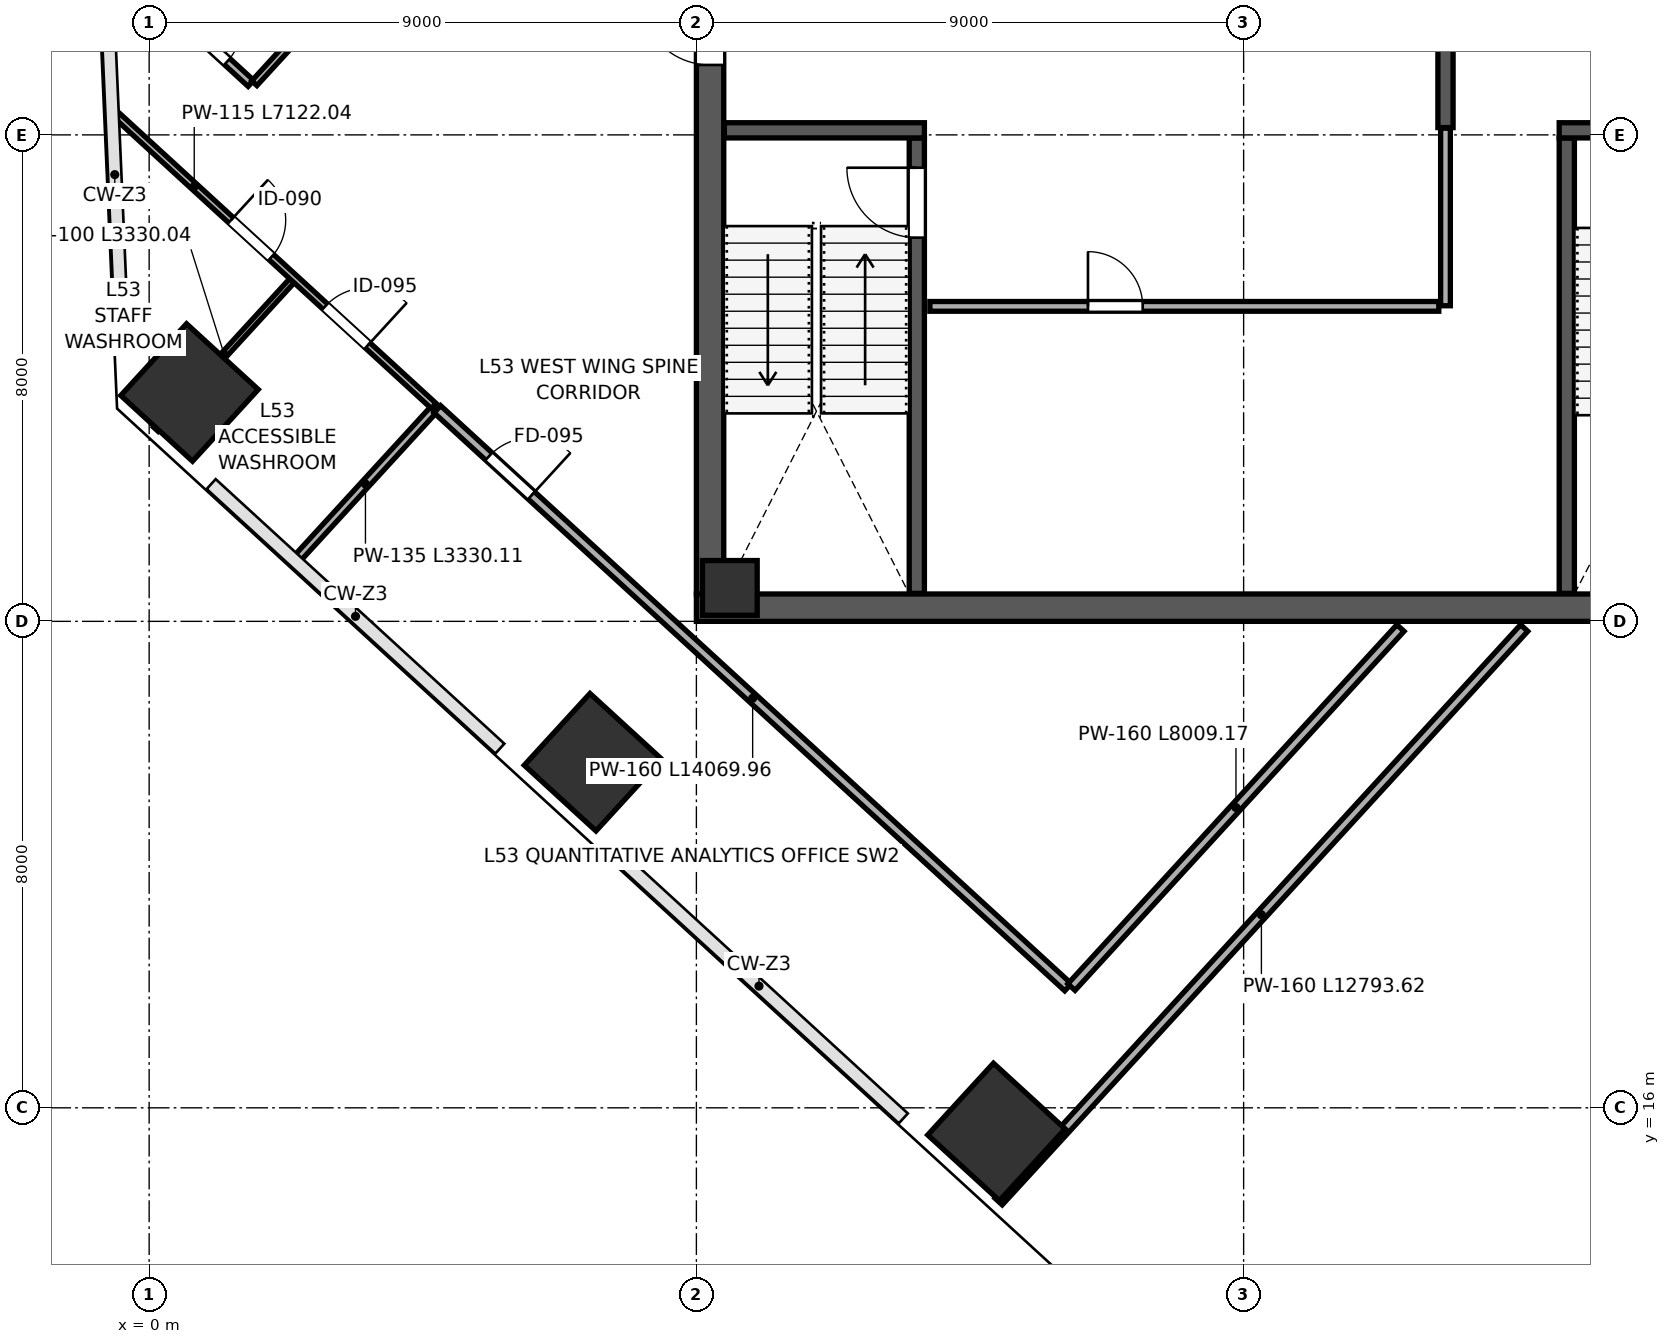
"""IFC4 building model, lengths in metres.
Left out: names, types, materials, properties, quantities, classifications, styles, units other than length and angle.
Written with IfcOpenShell. Run it as: python <this file> out.ifc"""

import sys

from ifc_helpers import new_model, si_unit, direction, frame, frame_2d, origin, origin_2d, place, context, subcontext, project, spatial, rectangle, extrude, source, transform, mapped, element, fill, save


model = new_model("IFC4")
c1 = context("Model", 3, precision=1e-05, world=origin(), true_north=direction((0.0, 1.0)))
c2 = subcontext(c1, "Body", "Model", "MODEL_VIEW")
j1 = project(units=[si_unit("LENGTHUNIT", "METRE"), si_unit("PLANEANGLEUNIT", "RADIAN")], contexts=[c1])
p1 = place(None, origin())
s1 = spatial("IfcSite", under=j1, at=p1, CompositionType="ELEMENT")
p2 = place(p1, origin())
s2 = spatial("IfcBuilding", under=s1, at=p2, CompositionType="ELEMENT")
p3 = place(p2, frame((0.0, 0.0, 237.4)))
s3 = spatial("IfcBuildingStorey", under=s2, at=p3, CompositionType="ELEMENT", Elevation=237.4)
m1 = source(origin(), c2, "Body", "SweptSolid", [
    extrude(rectangle(XDim=0.9, YDim=0.9, at=origin_2d()), origin(), (0.0, 0.0, 1.0), 4.199),
])
p4 = place(p3, frame((9.55, 24.55, 0.001), z_axis=(0.0, 0.0, 1.0), x_axis=(1.0, 0.0, 0.0)))
e1 = element("IfcColumn", 1, at=p4, inside=s3, PredefinedType="COLUMN", context=c2, shape_type="MappedRepresentation", body=[
    mapped(m1, transform((0.0, 0.0, 0.0), scale=1.0)),
])
m2 = source(origin(), c2, "Body", "SweptSolid", [
    extrude(rectangle(XDim=1.6, YDim=1.6, at=origin_2d()), origin(), (0.0, 0.0, 1.0), 4.199),
])
for number, where, z_axis, x_axis in (
    (2, (0.664, 27.764, 0.001), (0.0, 0.0, 1.0), (-0.737, 0.676, 0.0)),
    (3, (7.299, 21.683, 0.001), (0.0, 0.0, 1.0), (-0.737, 0.676, 0.0)),
    (4, (13.935, 15.603, 0.001), (0.0, 0.0, 1.0), (-0.737, 0.676, 0.0)),
):
    element("IfcColumn", number, at=place(p3, frame(where, z_axis=z_axis, x_axis=x_axis)), inside=s3, PredefinedType="COLUMN", context=c2, shape_type="MappedRepresentation", body=[
        mapped(m2, transform((0.0, 0.0, 0.0), scale=1.0)),
    ])
p5 = place(p3, frame((9.225, 24.45, 0.0), z_axis=(0.0, 0.0, 1.0), x_axis=(0.0, 1.0, 0.0)))
e5 = element("IfcWall", 5, at=p5, inside=s3, PredefinedType="SHEAR", context=c2, shape_type="SweptSolid", body=[
    extrude(rectangle(XDim=15.1, YDim=0.45, at=frame_2d((7.55, 0.0))), origin(), (0.0, 0.0, 1.0), 3.96),
])
p6 = place(p5, frame((8.7, 0.0, 0.0)))
e6 = element("IfcOpeningElement", 6, at=p6, cuts=e5, PredefinedType="OPENING", context=c2, shape_type="SweptSolid", body=[
    extrude(rectangle(XDim=1.15, YDim=2.2, at=frame_2d((0.575, 1.1))), frame((0.0, 0.235, 0.0), z_axis=(0.0, -1.0, 0.0), x_axis=(1.0, 0.0, 0.0)), (0.0, 0.0, 1.0), 0.47),
])
p7 = place(p3, frame((9.0, 24.225, 0.0), z_axis=(0.0, 0.0, 1.0), x_axis=(1.0, 0.0, 0.0)))
e7 = element("IfcWall", 7, at=p7, inside=s3, PredefinedType="SHEAR", context=c2, shape_type="SweptSolid", body=[
    extrude(rectangle(XDim=18.0, YDim=0.45, at=frame_2d((9.0, 0.0))), origin(), (0.0, 0.0, 1.0), 3.96),
])
p8 = place(p3, frame((12.625, 24.46, 0.0), z_axis=(0.0, 0.0, 1.0), x_axis=(0.0, 1.0, 0.0)))
e8 = element("IfcWall", 8, at=p8, inside=s3, PredefinedType="SHEAR", context=c2, shape_type="SweptSolid", body=[
    extrude(rectangle(XDim=7.49, YDim=0.25, at=frame_2d((3.745, 0.0))), origin(), (0.0, 0.0, 1.0), 3.96),
])
p9 = place(p8, frame((5.85, 0.0, 0.0)))
e9 = element("IfcOpeningElement", 9, at=p9, cuts=e8, PredefinedType="OPENING", context=c2, shape_type="SweptSolid", body=[
    extrude(rectangle(XDim=1.15, YDim=2.2, at=frame_2d((0.575, 1.1))), frame((0.0, 0.135, 0.0), z_axis=(0.0, -1.0, 0.0), x_axis=(1.0, 0.0, 0.0)), (0.0, 0.0, 1.0), 0.27),
])
p10 = place(p3, frame((9.46, 32.075, 0.0), z_axis=(0.0, 0.0, 1.0), x_axis=(1.0, 0.0, 0.0)))
e10 = element("IfcWall", 10, at=p10, inside=s3, PredefinedType="SHEAR", context=c2, shape_type="SweptSolid", body=[
    extrude(rectangle(XDim=3.29, YDim=0.25, at=frame_2d((1.645, 0.0))), origin(), (0.0, 0.0, 1.0), 3.96),
])
p11 = place(p3, frame((23.315, 24.46, 0.0), z_axis=(0.0, 0.0, 1.0), x_axis=(0.0, 1.0, 0.0)))
e11 = element("IfcWall", 11, at=p11, inside=s3, PredefinedType="SHEAR", context=c2, shape_type="SweptSolid", body=[
    extrude(rectangle(XDim=7.49, YDim=0.25, at=frame_2d((3.745, 0.0))), origin(), (0.0, 0.0, 1.0), 3.96),
])
p12 = place(p3, frame((23.19, 32.075, 0.0), z_axis=(0.0, 0.0, 1.0), x_axis=(1.0, 0.0, 0.0)))
e12 = element("IfcWall", 12, at=p12, inside=s3, PredefinedType="SHEAR", context=c2, shape_type="SweptSolid", body=[
    extrude(rectangle(XDim=3.35, YDim=0.25, at=frame_2d((1.675, 0.0))), origin(), (0.0, 0.0, 1.0), 3.96),
])
p13 = place(p12, frame((0.85, 0.0, 0.0)))
e13 = element("IfcOpeningElement", 13, at=p13, cuts=e12, PredefinedType="OPENING", context=c2, shape_type="SweptSolid", body=[
    extrude(rectangle(XDim=1.15, YDim=2.2, at=frame_2d((0.575, 1.1))), frame((0.0, 0.135, 0.0), z_axis=(0.0, -1.0, 0.0), x_axis=(1.0, 0.0, 0.0)), (0.0, 0.0, 1.0), 0.27),
])
p14 = place(p3, frame((21.32, 32.12, 0.0), z_axis=(0.0, 0.0, 1.0), x_axis=(0.0, 1.0, 0.0)))
e14 = element("IfcWall", 14, at=p14, inside=s3, PredefinedType="SHEAR", context=c2, shape_type="SweptSolid", body=[
    extrude(rectangle(XDim=7.42, YDim=0.25, at=frame_2d((3.71, 0.0))), origin(), (0.0, 0.0, 1.0), 3.96),
])
p15 = place(p14, frame((1.4, 0.0, 0.0)))
e15 = element("IfcOpeningElement", 15, at=p15, cuts=e14, PredefinedType="OPENING", context=c2, shape_type="SweptSolid", body=[
    extrude(rectangle(XDim=1.15, YDim=2.2, at=frame_2d((0.575, 1.1))), frame((0.0, 0.135, 0.0), z_axis=(0.0, -1.0, 0.0), x_axis=(1.0, 0.0, 0.0)), (0.0, 0.0, 1.0), 0.27),
])
p16 = place(p3, frame((12.84, 29.18, 0.0), z_axis=(0.0, 0.0, 1.0), x_axis=(1.0, 0.0, 0.0)))
e16 = element("IfcWall", 16, at=p16, inside=s3, PredefinedType="PARTITIONING", context=c2, shape_type="SweptSolid", body=[
    extrude(rectangle(XDim=8.37, YDim=0.16, at=frame_2d((4.185, 0.0))), origin(), (0.0, 0.0, 1.0), 3.96),
])
p17 = place(p16, frame((2.6, 0.0, 0.0)))
e17 = element("IfcOpeningElement", 17, at=p17, cuts=e16, PredefinedType="OPENING", context=c2, shape_type="SweptSolid", body=[
    extrude(rectangle(XDim=0.9, YDim=2.15, at=frame_2d((0.45, 1.075))), frame((0.0, 0.09, 0.0), z_axis=(0.0, -1.0, 0.0), x_axis=(1.0, 0.0, 0.0)), (0.0, 0.0, 1.0), 0.18),
])
p18 = place(p3, frame((21.32, 29.19, 0.0), z_axis=(0.0, 0.0, 1.0), x_axis=(0.0, 1.0, 0.0)))
e18 = element("IfcWall", 18, at=p18, inside=s3, PredefinedType="PARTITIONING", context=c2, shape_type="SweptSolid", body=[
    extrude(rectangle(XDim=2.92, YDim=0.16, at=frame_2d((1.46, 0.0))), origin(), (0.0, 0.0, 1.0), 3.96),
])
p19 = place(p3, frame((0.11, 27.159, 0.0), z_axis=(0.0, 0.0, 1.0), x_axis=(0.675605101048, 0.737263689217, 0.0)))
e19 = element("IfcWall", 19, at=p19, inside=s3, PredefinedType="PARTITIONING", context=c2, shape_type="SweptSolid", body=[
    extrude(rectangle(XDim=3.33, YDim=0.1, at=frame_2d((1.665, 0.0))), origin(), (0.0, 0.0, 1.0), 3.195),
])
p20 = place(p3, frame((2.432, 25.031, 0.0), z_axis=(0.0, 0.0, 1.0), x_axis=(0.675605101048, 0.737263689217, 0.0)))
e20 = element("IfcWall", 20, at=p20, inside=s3, PredefinedType="PARTITIONING", context=c2, shape_type="SweptSolid", body=[
    extrude(rectangle(XDim=3.33, YDim=0.135, at=frame_2d((1.665, 0.0))), origin(), (0.0, 0.0, 1.0), 3.195),
])
p21 = place(p3, frame((-0.571, 32.354, 0.0), z_axis=(0.0, 0.0, 1.0), x_axis=(0.737285035525, -0.675581805846, 0.0)))
e21 = element("IfcWall", 21, at=p21, inside=s3, PredefinedType="PARTITIONING", context=c2, shape_type="SweptSolid", body=[
    extrude(rectangle(XDim=7.122, YDim=0.115, at=frame_2d((3.561, 0.0))), origin(), (0.0, 0.0, 1.0), 3.96),
])
p22 = place(p21, frame((2.6, 0.0, 0.0)))
e22 = element("IfcOpeningElement", 22, at=p22, cuts=e21, PredefinedType="OPENING", context=c2, shape_type="SweptSolid", body=[
    extrude(rectangle(XDim=0.9, YDim=2.15, at=frame_2d((0.45, 1.075))), frame((0.0, 0.067, 0.0), z_axis=(0.0, -1.0, 0.0), x_axis=(1.0, 0.0, 0.0)), (0.0, 0.0, 1.0), 0.135),
])
p23 = place(p21, frame((4.7, 0.0, 0.0)))
e23 = element("IfcOpeningElement", 23, at=p23, cuts=e21, PredefinedType="OPENING", context=c2, shape_type="SweptSolid", body=[
    extrude(rectangle(XDim=0.95, YDim=2.15, at=frame_2d((0.475, 1.075))), frame((0.0, 0.067, 0.0), z_axis=(0.0, -1.0, 0.0), x_axis=(1.0, 0.0, 0.0)), (0.0, 0.0, 1.0), 0.135),
])
p24 = place(p3, frame((4.739, 27.489, 0.0), z_axis=(0.0, 0.0, 1.0), x_axis=(0.737276572642, -0.675591041558, 0.0)))
e24 = element("IfcWall", 24, at=p24, inside=s3, PredefinedType="PARTITIONING", context=c2, shape_type="SweptSolid", body=[
    extrude(rectangle(XDim=14.07, YDim=0.16, at=frame_2d((7.035, 0.0))), origin(), (0.0, 0.0, 1.0), 3.96),
])
p25 = place(p24, frame((1.15, 0.0, 0.0)))
e25 = element("IfcOpeningElement", 25, at=p25, cuts=e24, PredefinedType="OPENING", context=c2, shape_type="SweptSolid", body=[
    extrude(rectangle(XDim=0.95, YDim=2.15, at=frame_2d((0.475, 1.075))), frame((0.0, 0.09, 0.0), z_axis=(0.0, -1.0, 0.0), x_axis=(1.0, 0.0, 0.0)), (0.0, 0.0, 1.0), 0.18),
])
p26 = place(p3, frame((15.168, 17.986, 0.0), z_axis=(0.0, 0.0, 1.0), x_axis=(0.675616954369, 0.737252827034, 0.0)))
e26 = element("IfcWall", 26, at=p26, inside=s3, PredefinedType="PARTITIONING", context=c2, shape_type="SweptSolid", body=[
    extrude(rectangle(XDim=8.009, YDim=0.16, at=frame_2d((4.005, 0.0))), origin(), (0.0, 0.0, 1.0), 3.96),
])
p27 = place(p3, frame((-0.044, 34.421, 0.0), z_axis=(0.0, 0.0, 1.0), x_axis=(0.73728894688, -0.675577537229, 0.0)))
e27 = element("IfcWall", 27, at=p27, inside=s3, PredefinedType="PARTITIONING", context=c2, shape_type="SweptSolid", body=[
    extrude(rectangle(XDim=2.33, YDim=0.135, at=frame_2d((1.165, 0.0))), origin(), (0.0, 0.0, 1.0), 3.96),
])
p28 = place(p27, frame((0.85, 0.0, 0.0)))
e28 = element("IfcOpeningElement", 28, at=p28, cuts=e27, PredefinedType="OPENING", context=c2, shape_type="SweptSolid", body=[
    extrude(rectangle(XDim=0.95, YDim=2.15, at=frame_2d((0.475, 1.075))), frame((0.0, 0.078, 0.0), z_axis=(0.0, -1.0, 0.0), x_axis=(1.0, 0.0, 0.0)), (0.0, 0.0, 1.0), 0.155),
])
p29 = place(p3, frame((1.73, 32.85, 0.0), z_axis=(0.0, 0.0, 1.0), x_axis=(0.675589845589, 0.737277668546, 0.0)))
e29 = element("IfcWall", 29, at=p29, inside=s3, PredefinedType="PARTITIONING", context=c2, shape_type="SweptSolid", body=[
    extrude(rectangle(XDim=26.742, YDim=0.115, at=frame_2d((13.371, 0.0))), origin(), (0.0, 0.0, 1.0), 3.96),
])
p30 = place(p3, frame((13.971, 14.458, 0.0), z_axis=(0.0, 0.0, 1.0), x_axis=(0.675595861889, 0.737272155583, 0.0)))
e30 = element("IfcWall", 30, at=p30, inside=s3, PredefinedType="PARTITIONING", context=c2, shape_type="SweptSolid", body=[
    extrude(rectangle(XDim=12.794, YDim=0.16, at=frame_2d((6.397, 0.0))), origin(), (0.0, 0.0, 1.0), 3.96),
])
m3 = source(origin(), c2, "Body", "SweptSolid", [
    extrude(rectangle(XDim=1.15, YDim=2.2, at=frame_2d((0.575, 1.1))), frame((0.0, 0.025, 0.0), z_axis=(0.0, -1.0, 0.0), x_axis=(1.0, 0.0, 0.0)), (0.0, 0.0, 1.0), 0.05),
])
p31 = place(p9, origin())
e31 = element("IfcDoor", 31, at=p31, inside=s3, OperationType="SINGLE_SWING_RIGHT", PredefinedType="DOOR", context=c2, shape_type="MappedRepresentation", body=[
    mapped(m3, transform((0.0, 0.0, 0.0), scale=1.0)),
])
fill(e9, e31)
m4 = source(origin(), c2, "Body", "SweptSolid", [
    extrude(rectangle(XDim=1.15, YDim=2.2, at=frame_2d((0.575, 1.1))), frame((0.0, 0.025, 0.0), z_axis=(0.0, -1.0, 0.0), x_axis=(1.0, 0.0, 0.0)), (0.0, 0.0, 1.0), 0.05),
])
p32 = place(p6, origin())
e32 = element("IfcDoor", 32, at=p32, inside=s3, OperationType="SINGLE_SWING_RIGHT", PredefinedType="DOOR", context=c2, shape_type="MappedRepresentation", body=[
    mapped(m4, transform((0.0, 0.0, 0.0), scale=1.0)),
])
fill(e6, e32)
m5 = source(origin(), c2, "Body", "SweptSolid", [
    extrude(rectangle(XDim=0.9, YDim=2.15, at=frame_2d((0.45, 1.075))), frame((0.0, 0.025, 0.0), z_axis=(0.0, -1.0, 0.0), x_axis=(1.0, 0.0, 0.0)), (0.0, 0.0, 1.0), 0.05),
])
p33 = place(p17, origin())
e33 = element("IfcDoor", 33, at=p33, inside=s3, OperationType="SINGLE_SWING_LEFT", PredefinedType="DOOR", context=c2, shape_type="MappedRepresentation", body=[
    mapped(m5, transform((0.0, 0.0, 0.0), scale=1.0)),
])
fill(e17, e33)
m6 = source(origin(), c2, "Body", "SweptSolid", [
    extrude(rectangle(XDim=0.9, YDim=2.15, at=frame_2d((0.45, 1.075))), frame((0.0, 0.025, 0.0), z_axis=(0.0, -1.0, 0.0), x_axis=(1.0, 0.0, 0.0)), (0.0, 0.0, 1.0), 0.05),
])
p34 = place(p22, origin())
e34 = element("IfcDoor", 34, at=p34, inside=s3, OperationType="SINGLE_SWING_LEFT", PredefinedType="DOOR", context=c2, shape_type="MappedRepresentation", body=[
    mapped(m6, transform((0.0, 0.0, 0.0), scale=1.0)),
])
fill(e22, e34)
m7 = source(origin(), c2, "Body", "SweptSolid", [
    extrude(rectangle(XDim=0.95, YDim=2.15, at=frame_2d((0.475, 1.075))), frame((0.0, 0.025, 0.0), z_axis=(0.0, -1.0, 0.0), x_axis=(1.0, 0.0, 0.0)), (0.0, 0.0, 1.0), 0.05),
])
p35 = place(p23, origin())
e35 = element("IfcDoor", 35, at=p35, inside=s3, OperationType="SINGLE_SWING_RIGHT", PredefinedType="DOOR", context=c2, shape_type="MappedRepresentation", body=[
    mapped(m7, transform((0.0, 0.0, 0.0), scale=1.0)),
])
fill(e23, e35)
m8 = source(origin(), c2, "Body", "SweptSolid", [
    extrude(rectangle(XDim=0.95, YDim=2.15, at=frame_2d((0.475, 1.075))), frame((0.0, 0.025, 0.0), z_axis=(0.0, -1.0, 0.0), x_axis=(1.0, 0.0, 0.0)), (0.0, 0.0, 1.0), 0.05),
])
p36 = place(p25, origin())
e36 = element("IfcDoor", 36, at=p36, inside=s3, OperationType="SINGLE_SWING_RIGHT", PredefinedType="DOOR", context=c2, shape_type="MappedRepresentation", body=[
    mapped(m8, transform((0.0, 0.0, 0.0), scale=1.0)),
])
fill(e25, e36)
p37 = place(p28, origin())
e37 = element("IfcDoor", 37, at=p37, inside=s3, OperationType="SINGLE_SWING_LEFT", PredefinedType="DOOR", context=c2, shape_type="MappedRepresentation", body=[
    mapped(m7, transform((0.0, 0.0, 0.0), scale=1.0)),
])
fill(e28, e37)
save(model, sys.argv[1])
